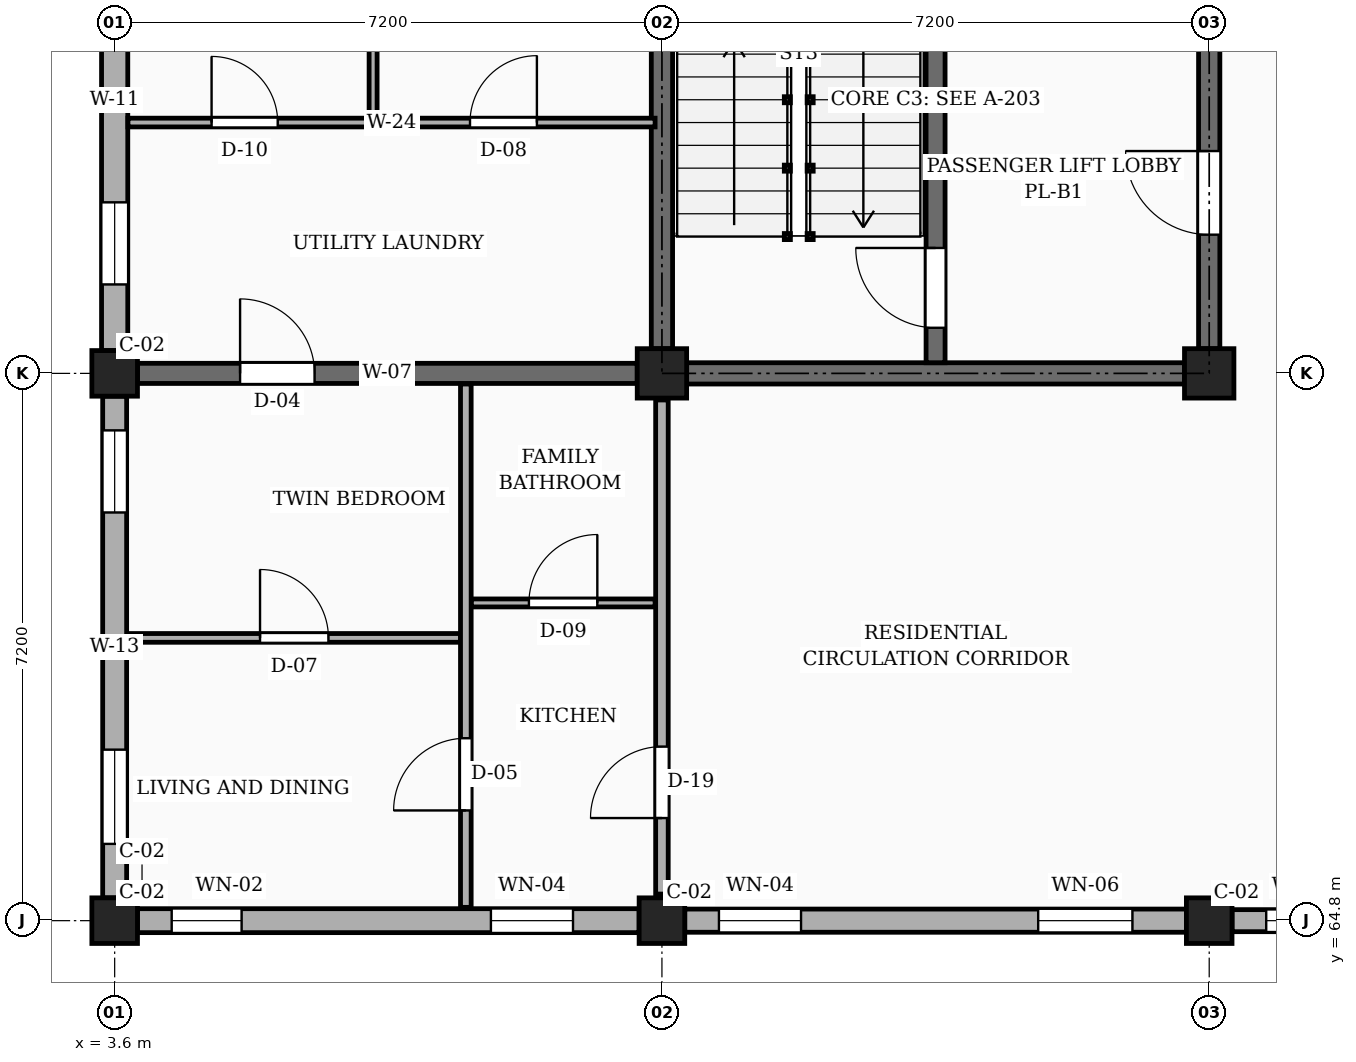
"""IFC4 building model, lengths in metres.
Left out: names, types, materials, properties, quantities, classifications, styles, units other than length and angle.
Written with IfcOpenShell. Run it as: python <this file> out.ifc"""

import sys

from ifc_helpers import new_model, si_unit, direction, frame, frame_2d, origin, origin_2d, place, context, subcontext, project, spatial, rectangle, extrude, element, fill, save


model = new_model("IFC4")
c1 = context("Model", 3, precision=1e-05, world=origin(), true_north=direction((0.0, 1.0)))
c2 = subcontext(c1, "Body", "Model", "MODEL_VIEW")
j1 = project(units=[si_unit("LENGTHUNIT", "METRE"), si_unit("PLANEANGLEUNIT", "RADIAN")], contexts=[c1])
p1 = place(None, origin())
s1 = spatial("IfcSite", under=j1, at=p1, CompositionType="ELEMENT")
p2 = place(p1, origin())
s2 = spatial("IfcBuilding", under=s1, at=p2, CompositionType="ELEMENT")
p3 = place(p2, frame((0.0, 0.0, 4.5)))
s3 = spatial("IfcBuildingStorey", under=s2, at=p3, CompositionType="ELEMENT", Elevation=4.5)
for number, where, z_axis, x_axis in (
    (1, (3.6, 64.8, 0.0), (0.0, 0.0, 1.0), (1.0, 0.0, 0.0)),
    (2, (3.6, 72.0, 0.0), (0.0, 0.0, 1.0), (1.0, 0.0, 0.0)),
    (3, (10.8, 64.8, 0.0), (0.0, 0.0, 1.0), (1.0, 0.0, 0.0)),
):
    element("IfcColumn", number, at=place(p3, frame(where, z_axis=z_axis, x_axis=x_axis)), inside=s3, PredefinedType="COLUMN", context=c2, shape_type="SweptSolid", body=[
        extrude(rectangle(XDim=0.6, YDim=0.6, at=origin_2d()), origin(), (0.0, 0.0, 1.0), 3.15),
    ])
p4 = place(p3, frame((10.8, 72.0, 0.0), z_axis=(0.0, 0.0, 1.0), x_axis=(1.0, 0.0, 0.0)))
e4 = element("IfcColumn", 4, at=p4, inside=s3, PredefinedType="COLUMN", context=c2, shape_type="SweptSolid", body=[
    extrude(rectangle(XDim=0.65, YDim=0.65, at=origin_2d()), origin(), (0.0, 0.0, 1.0), 3.15),
])
p5 = place(p3, frame((18.0, 64.8, 0.0), z_axis=(0.0, 0.0, 1.0), x_axis=(1.0, 0.0, 0.0)))
e5 = element("IfcColumn", 5, at=p5, inside=s3, PredefinedType="COLUMN", context=c2, shape_type="SweptSolid", body=[
    extrude(rectangle(XDim=0.6, YDim=0.6, at=origin_2d()), origin(), (0.0, 0.0, 1.0), 3.15),
])
p6 = place(p3, frame((18.0, 72.0, 0.0), z_axis=(0.0, 0.0, 1.0), x_axis=(1.0, 0.0, 0.0)))
e6 = element("IfcColumn", 6, at=p6, inside=s3, PredefinedType="COLUMN", context=c2, shape_type="SweptSolid", body=[
    extrude(rectangle(XDim=0.65, YDim=0.65, at=origin_2d()), origin(), (0.0, 0.0, 1.0), 3.15),
])
p7 = place(p3, frame((3.9, 72.0, 0.0), z_axis=(0.0, 0.0, 1.0), x_axis=(1.0, 0.0, 0.0)))
e7 = element("IfcWall", 7, at=p7, inside=s3, PredefinedType="SOLIDWALL", context=c2, shape_type="SweptSolid", body=[
    extrude(rectangle(XDim=6.575, YDim=0.265, at=frame_2d((3.288, 0.0))), origin(), (0.0, 0.0, 1.0), 2.21),
])
p8 = place(p7, frame((1.35, 0.0, 0.0)))
e8 = element("IfcOpeningElement", 8, at=p8, cuts=e7, PredefinedType="OPENING", context=c2, shape_type="SweptSolid", body=[
    extrude(rectangle(XDim=0.98, YDim=2.12, at=frame_2d((0.49, 1.06))), frame((0.0, 0.143, 0.0), z_axis=(0.0, -1.0, 0.0), x_axis=(1.0, 0.0, 0.0)), (0.0, 0.0, 1.0), 0.285),
])
p9 = place(p3, frame((3.9, 64.8, 0.0), z_axis=(0.0, 0.0, 1.0), x_axis=(1.0, 0.0, 0.0)))
e9 = element("IfcWall", 9, at=p9, inside=s3, PredefinedType="SOLIDWALL", context=c2, shape_type="SweptSolid", body=[
    extrude(rectangle(XDim=6.6, YDim=0.315, at=frame_2d((3.3, 0.0))), origin(), (0.0, 0.0, 1.0), 2.48),
])
p10 = place(p9, frame((0.45, 0.0, 0.78)))
e10 = element("IfcOpeningElement", 10, at=p10, cuts=e9, PredefinedType="OPENING", context=c2, shape_type="SweptSolid", body=[
    extrude(rectangle(XDim=0.92, YDim=1.15, at=frame_2d((0.46, 0.575))), frame((0.0, 0.167, 0.0), z_axis=(0.0, -1.0, 0.0), x_axis=(1.0, 0.0, 0.0)), (0.0, 0.0, 1.0), 0.335),
])
p11 = place(p9, frame((4.65, 0.0, 0.78)))
e11 = element("IfcOpeningElement", 11, at=p11, cuts=e9, PredefinedType="OPENING", context=c2, shape_type="SweptSolid", body=[
    extrude(rectangle(XDim=1.08, YDim=1.15, at=frame_2d((0.54, 0.575))), frame((0.0, 0.167, 0.0), z_axis=(0.0, -1.0, 0.0), x_axis=(1.0, 0.0, 0.0)), (0.0, 0.0, 1.0), 0.335),
])
p12 = place(p3, frame((11.1, 64.8, 0.0), z_axis=(0.0, 0.0, 1.0), x_axis=(1.0, 0.0, 0.0)))
e12 = element("IfcWall", 12, at=p12, inside=s3, PredefinedType="SOLIDWALL", context=c2, shape_type="SweptSolid", body=[
    extrude(rectangle(XDim=6.6, YDim=0.305, at=frame_2d((3.3, 0.0))), origin(), (0.0, 0.0, 1.0), 2.48),
])
p13 = place(p12, frame((0.45, 0.0, 0.78)))
e13 = element("IfcOpeningElement", 13, at=p13, cuts=e12, PredefinedType="OPENING", context=c2, shape_type="SweptSolid", body=[
    extrude(rectangle(XDim=1.08, YDim=1.15, at=frame_2d((0.54, 0.575))), frame((0.0, 0.163, 0.0), z_axis=(0.0, -1.0, 0.0), x_axis=(1.0, 0.0, 0.0)), (0.0, 0.0, 1.0), 0.325),
])
p14 = place(p12, frame((4.65, 0.0, 0.78)))
e14 = element("IfcOpeningElement", 14, at=p14, cuts=e12, PredefinedType="OPENING", context=c2, shape_type="SweptSolid", body=[
    extrude(rectangle(XDim=1.24, YDim=1.15, at=frame_2d((0.62, 0.575))), frame((0.0, 0.163, 0.0), z_axis=(0.0, -1.0, 0.0), x_axis=(1.0, 0.0, 0.0)), (0.0, 0.0, 1.0), 0.325),
])
p15 = place(p3, frame((18.3, 64.8, 0.0), z_axis=(0.0, 0.0, 1.0), x_axis=(1.0, 0.0, 0.0)))
e15 = element("IfcWall", 15, at=p15, inside=s3, PredefinedType="SOLIDWALL", context=c2, shape_type="SweptSolid", body=[
    extrude(rectangle(XDim=6.6, YDim=0.29, at=frame_2d((3.3, 0.0))), origin(), (0.0, 0.0, 1.0), 2.48),
])
p16 = place(p15, frame((0.45, 0.0, 0.78)))
e16 = element("IfcOpeningElement", 16, at=p16, cuts=e15, PredefinedType="OPENING", context=c2, shape_type="SweptSolid", body=[
    extrude(rectangle(XDim=1.04, YDim=1.26, at=frame_2d((0.52, 0.63))), frame((0.0, 0.155, 0.0), z_axis=(0.0, -1.0, 0.0), x_axis=(1.0, 0.0, 0.0)), (0.0, 0.0, 1.0), 0.31),
])
p17 = place(p15, frame((2.13, 0.0, 0.78)))
e17 = element("IfcOpeningElement", 17, at=p17, cuts=e15, PredefinedType="OPENING", context=c2, shape_type="SweptSolid", body=[
    extrude(rectangle(XDim=1.2, YDim=1.26, at=frame_2d((0.6, 0.63))), frame((0.0, 0.155, 0.0), z_axis=(0.0, -1.0, 0.0), x_axis=(1.0, 0.0, 0.0)), (0.0, 0.0, 1.0), 0.31),
])
p18 = place(p15, frame((4.58, 0.0, 0.78)))
e18 = element("IfcOpeningElement", 18, at=p18, cuts=e15, PredefinedType="OPENING", context=c2, shape_type="SweptSolid", body=[
    extrude(rectangle(XDim=0.96, YDim=1.26, at=frame_2d((0.48, 0.63))), frame((0.0, 0.155, 0.0), z_axis=(0.0, -1.0, 0.0), x_axis=(1.0, 0.0, 0.0)), (0.0, 0.0, 1.0), 0.31),
])
p19 = place(p3, frame((3.6, 78.9, 0.0), z_axis=(0.0, 0.0, 1.0), x_axis=(0.0, -1.0, 0.0)))
e19 = element("IfcWall", 19, at=p19, inside=s3, PredefinedType="SOLIDWALL", context=c2, shape_type="SweptSolid", body=[
    extrude(rectangle(XDim=6.6, YDim=0.345, at=frame_2d((3.3, 0.0))), origin(), (0.0, 0.0, 1.0), 2.48),
])
p20 = place(p19, frame((0.45, 0.0, 0.78)))
e20 = element("IfcOpeningElement", 20, at=p20, cuts=e19, PredefinedType="OPENING", context=c2, shape_type="SweptSolid", body=[
    extrude(rectangle(XDim=0.92, YDim=1.15, at=frame_2d((0.46, 0.575))), frame((0.0, 0.183, 0.0), z_axis=(0.0, -1.0, 0.0), x_axis=(1.0, 0.0, 0.0)), (0.0, 0.0, 1.0), 0.365),
])
p21 = place(p19, frame((4.65, 0.0, 0.78)))
e21 = element("IfcOpeningElement", 21, at=p21, cuts=e19, PredefinedType="OPENING", context=c2, shape_type="SweptSolid", body=[
    extrude(rectangle(XDim=1.08, YDim=1.15, at=frame_2d((0.54, 0.575))), frame((0.0, 0.183, 0.0), z_axis=(0.0, -1.0, 0.0), x_axis=(1.0, 0.0, 0.0)), (0.0, 0.0, 1.0), 0.365),
])
p22 = place(p3, frame((3.6, 71.7, 0.0), z_axis=(0.0, 0.0, 1.0), x_axis=(0.0, -1.0, 0.0)))
e22 = element("IfcWall", 22, at=p22, inside=s3, PredefinedType="SOLIDWALL", context=c2, shape_type="SweptSolid", body=[
    extrude(rectangle(XDim=6.6, YDim=0.315, at=frame_2d((3.3, 0.0))), origin(), (0.0, 0.0, 1.0), 2.48),
])
p23 = place(p22, frame((0.45, 0.0, 0.78)))
e23 = element("IfcOpeningElement", 23, at=p23, cuts=e22, PredefinedType="OPENING", context=c2, shape_type="SweptSolid", body=[
    extrude(rectangle(XDim=1.08, YDim=1.15, at=frame_2d((0.54, 0.575))), frame((0.0, 0.167, 0.0), z_axis=(0.0, -1.0, 0.0), x_axis=(1.0, 0.0, 0.0)), (0.0, 0.0, 1.0), 0.335),
])
p24 = place(p22, frame((4.65, 0.0, 0.78)))
e24 = element("IfcOpeningElement", 24, at=p24, cuts=e22, PredefinedType="OPENING", context=c2, shape_type="SweptSolid", body=[
    extrude(rectangle(XDim=1.24, YDim=1.15, at=frame_2d((0.62, 0.575))), frame((0.0, 0.167, 0.0), z_axis=(0.0, -1.0, 0.0), x_axis=(1.0, 0.0, 0.0)), (0.0, 0.0, 1.0), 0.335),
])
p25 = place(p3, frame((10.8, 72.325, 0.0), z_axis=(0.0, 0.0, 1.0), x_axis=(0.0, 1.0, 0.0)))
e25 = element("IfcWall", 25, at=p25, inside=s3, PredefinedType="SHEAR", context=c2, shape_type="SweptSolid", body=[
    extrude(rectangle(XDim=6.55, YDim=0.28, at=frame_2d((3.275, 0.0))), origin(), (0.0, 0.0, 1.0), 2.91),
])
p26 = place(p3, frame((18.0, 72.325, 0.0), z_axis=(0.0, 0.0, 1.0), x_axis=(0.0, 1.0, 0.0)))
e26 = element("IfcWall", 26, at=p26, inside=s3, PredefinedType="SHEAR", context=c2, shape_type="SweptSolid", body=[
    extrude(rectangle(XDim=6.55, YDim=0.28, at=frame_2d((3.275, 0.0))), origin(), (0.0, 0.0, 1.0), 2.91),
])
p27 = place(p26, frame((1.5, 0.0, 0.0)))
e27 = element("IfcOpeningElement", 27, at=p27, cuts=e26, PredefinedType="OPENING", context=c2, shape_type="SweptSolid", body=[
    extrude(rectangle(XDim=1.1, YDim=2.15, at=frame_2d((0.55, 1.075))), frame((0.0, 0.15, 0.0), z_axis=(0.0, -1.0, 0.0), x_axis=(1.0, 0.0, 0.0)), (0.0, 0.0, 1.0), 0.3),
])
p28 = place(p3, frame((11.125, 72.0, 0.0), z_axis=(0.0, 0.0, 1.0), x_axis=(1.0, 0.0, 0.0)))
e28 = element("IfcWall", 28, at=p28, inside=s3, PredefinedType="SHEAR", context=c2, shape_type="SweptSolid", body=[
    extrude(rectangle(XDim=6.55, YDim=0.28, at=frame_2d((3.275, 0.0))), origin(), (0.0, 0.0, 1.0), 2.91),
])
p29 = place(p3, frame((14.4, 72.14, 0.0), z_axis=(0.0, 0.0, 1.0), x_axis=(0.0, 1.0, 0.0)))
e29 = element("IfcWall", 29, at=p29, inside=s3, PredefinedType="SHEAR", context=c2, shape_type="SweptSolid", body=[
    extrude(rectangle(XDim=6.92, YDim=0.25, at=frame_2d((3.46, 0.0))), origin(), (0.0, 0.0, 1.0), 2.91),
])
p30 = place(p29, frame((0.46, 0.0, 0.0)))
e30 = element("IfcOpeningElement", 30, at=p30, cuts=e29, PredefinedType="OPENING", context=c2, shape_type="SweptSolid", body=[
    extrude(rectangle(XDim=1.05, YDim=2.15, at=frame_2d((0.525, 1.075))), frame((0.0, 0.135, 0.0), z_axis=(0.0, -1.0, 0.0), x_axis=(1.0, 0.0, 0.0)), (0.0, 0.0, 1.0), 0.27),
])
p31 = place(p3, frame((10.8, 65.15, 0.0), z_axis=(0.0, 0.0, 1.0), x_axis=(0.0, 1.0, 0.0)))
e31 = element("IfcWall", 31, at=p31, inside=s3, PredefinedType="PARTITIONING", context=c2, shape_type="SweptSolid", body=[
    extrude(rectangle(XDim=6.5, YDim=0.165, at=frame_2d((3.25, 0.0))), origin(), (0.0, 0.0, 1.0), 2.26),
])
p32 = place(p31, frame((1.0, 0.0, 0.0)))
e32 = element("IfcOpeningElement", 32, at=p32, cuts=e31, PredefinedType="OPENING", context=c2, shape_type="SweptSolid", body=[
    extrude(rectangle(XDim=0.94, YDim=2.12, at=frame_2d((0.47, 1.06))), frame((0.0, 0.093, 0.0), z_axis=(0.0, -1.0, 0.0), x_axis=(1.0, 0.0, 0.0)), (0.0, 0.0, 1.0), 0.185),
])
p33 = place(p3, frame((3.775, 68.52, 0.0), z_axis=(0.0, 0.0, 1.0), x_axis=(1.0, 0.0, 0.0)))
e33 = element("IfcWall", 33, at=p33, inside=s3, PredefinedType="PARTITIONING", context=c2, shape_type="SweptSolid", body=[
    extrude(rectangle(XDim=4.375, YDim=0.115, at=frame_2d((2.188, 0.0))), origin(), (0.0, 0.0, 1.0), 2.345),
])
p34 = place(p33, frame((1.738, 0.0, 0.0)))
e34 = element("IfcOpeningElement", 34, at=p34, cuts=e33, PredefinedType="OPENING", context=c2, shape_type="SweptSolid", body=[
    extrude(rectangle(XDim=0.9, YDim=2.1, at=frame_2d((0.45, 1.05))), frame((0.0, 0.067, 0.0), z_axis=(0.0, -1.0, 0.0), x_axis=(1.0, 0.0, 0.0)), (0.0, 0.0, 1.0), 0.135),
])
p35 = place(p3, frame((8.29, 68.98, 0.0), z_axis=(0.0, 0.0, 1.0), x_axis=(1.0, 0.0, 0.0)))
e35 = element("IfcWall", 35, at=p35, inside=s3, PredefinedType="PARTITIONING", context=c2, shape_type="SweptSolid", body=[
    extrude(rectangle(XDim=2.42, YDim=0.105, at=frame_2d((1.21, 0.0))), origin(), (0.0, 0.0, 1.0), 2.345),
])
p36 = place(p35, frame((0.76, 0.0, 0.0)))
e36 = element("IfcOpeningElement", 36, at=p36, cuts=e35, PredefinedType="OPENING", context=c2, shape_type="SweptSolid", body=[
    extrude(rectangle(XDim=0.9, YDim=2.05, at=frame_2d((0.45, 1.025))), frame((0.0, 0.062, 0.0), z_axis=(0.0, -1.0, 0.0), x_axis=(1.0, 0.0, 0.0)), (0.0, 0.0, 1.0), 0.125),
])
p37 = place(p3, frame((8.22, 64.975, 0.0), z_axis=(0.0, 0.0, 1.0), x_axis=(0.0, 1.0, 0.0)))
e37 = element("IfcWall", 37, at=p37, inside=s3, PredefinedType="PARTITIONING", context=c2, shape_type="SweptSolid", body=[
    extrude(rectangle(XDim=6.885, YDim=0.14, at=frame_2d((3.442, 0.0))), origin(), (0.0, 0.0, 1.0), 2.345),
])
p38 = place(p37, frame((1.275, 0.0, 0.0)))
e38 = element("IfcOpeningElement", 38, at=p38, cuts=e37, PredefinedType="OPENING", context=c2, shape_type="SweptSolid", body=[
    extrude(rectangle(XDim=0.95, YDim=2.1, at=frame_2d((0.475, 1.05))), frame((0.0, 0.08, 0.0), z_axis=(0.0, -1.0, 0.0), x_axis=(1.0, 0.0, 0.0)), (0.0, 0.0, 1.0), 0.16),
])
p39 = place(p3, frame((3.775, 75.3, 0.0), z_axis=(0.0, 0.0, 1.0), x_axis=(1.0, 0.0, 0.0)))
e39 = element("IfcWall", 39, at=p39, inside=s3, PredefinedType="PARTITIONING", context=c2, shape_type="SweptSolid", body=[
    extrude(rectangle(XDim=6.935, YDim=0.115, at=frame_2d((3.468, 0.0))), origin(), (0.0, 0.0, 1.0), 2.345),
])
p40 = place(p39, frame((1.1, 0.0, 0.0)))
e40 = element("IfcOpeningElement", 40, at=p40, cuts=e39, PredefinedType="OPENING", context=c2, shape_type="SweptSolid", body=[
    extrude(rectangle(XDim=0.87, YDim=2.05, at=frame_2d((0.435, 1.025))), frame((0.0, 0.067, 0.0), z_axis=(0.0, -1.0, 0.0), x_axis=(1.0, 0.0, 0.0)), (0.0, 0.0, 1.0), 0.135),
])
p41 = place(p39, frame((4.5, 0.0, 0.0)))
e41 = element("IfcOpeningElement", 41, at=p41, cuts=e39, PredefinedType="OPENING", context=c2, shape_type="SweptSolid", body=[
    extrude(rectangle(XDim=0.88, YDim=2.08, at=frame_2d((0.44, 1.04))), frame((0.0, 0.067, 0.0), z_axis=(0.0, -1.0, 0.0), x_axis=(1.0, 0.0, 0.0)), (0.0, 0.0, 1.0), 0.135),
])
p42 = place(p3, frame((7.0, 75.37, 0.0), z_axis=(0.0, 0.0, 1.0), x_axis=(0.0, 1.0, 0.0)))
e42 = element("IfcWall", 42, at=p42, inside=s3, PredefinedType="PARTITIONING", context=c2, shape_type="SweptSolid", body=[
    extrude(rectangle(XDim=3.69, YDim=0.105, at=frame_2d((1.845, 0.0))), origin(), (0.0, 0.0, 1.0), 2.345),
])
p43 = place(p10, origin())
e43 = element("IfcWindow", 43, at=p43, inside=s3, PartitioningType="SINGLE_PANEL", PredefinedType="WINDOW", context=c2, shape_type="SweptSolid", body=[
    extrude(rectangle(XDim=0.92, YDim=1.15, at=frame_2d((0.46, 0.575))), frame((0.0, 0.03, 0.0), z_axis=(0.0, -1.0, 0.0), x_axis=(1.0, 0.0, 0.0)), (0.0, 0.0, 1.0), 0.06),
])
fill(e10, e43)
p44 = place(p11, origin())
e44 = element("IfcWindow", 44, at=p44, inside=s3, PartitioningType="SINGLE_PANEL", PredefinedType="WINDOW", context=c2, shape_type="SweptSolid", body=[
    extrude(rectangle(XDim=1.08, YDim=1.15, at=frame_2d((0.54, 0.575))), frame((0.0, 0.03, 0.0), z_axis=(0.0, -1.0, 0.0), x_axis=(1.0, 0.0, 0.0)), (0.0, 0.0, 1.0), 0.06),
])
fill(e11, e44)
p45 = place(p13, origin())
e45 = element("IfcWindow", 45, at=p45, inside=s3, PartitioningType="SINGLE_PANEL", PredefinedType="WINDOW", context=c2, shape_type="SweptSolid", body=[
    extrude(rectangle(XDim=1.08, YDim=1.15, at=frame_2d((0.54, 0.575))), frame((0.0, 0.03, 0.0), z_axis=(0.0, -1.0, 0.0), x_axis=(1.0, 0.0, 0.0)), (0.0, 0.0, 1.0), 0.06),
])
fill(e13, e45)
p46 = place(p14, origin())
e46 = element("IfcWindow", 46, at=p46, inside=s3, PartitioningType="SINGLE_PANEL", PredefinedType="WINDOW", context=c2, shape_type="SweptSolid", body=[
    extrude(rectangle(XDim=1.24, YDim=1.15, at=frame_2d((0.62, 0.575))), frame((0.0, 0.03, 0.0), z_axis=(0.0, -1.0, 0.0), x_axis=(1.0, 0.0, 0.0)), (0.0, 0.0, 1.0), 0.06),
])
fill(e14, e46)
p47 = place(p16, origin())
e47 = element("IfcWindow", 47, at=p47, inside=s3, PartitioningType="SINGLE_PANEL", PredefinedType="WINDOW", context=c2, shape_type="SweptSolid", body=[
    extrude(rectangle(XDim=1.04, YDim=1.26, at=frame_2d((0.52, 0.63))), frame((0.0, 0.03, 0.0), z_axis=(0.0, -1.0, 0.0), x_axis=(1.0, 0.0, 0.0)), (0.0, 0.0, 1.0), 0.06),
])
fill(e16, e47)
p48 = place(p21, origin())
e48 = element("IfcWindow", 48, at=p48, inside=s3, PartitioningType="SINGLE_PANEL", PredefinedType="WINDOW", context=c2, shape_type="SweptSolid", body=[
    extrude(rectangle(XDim=1.08, YDim=1.15, at=frame_2d((0.54, 0.575))), frame((0.0, 0.03, 0.0), z_axis=(0.0, -1.0, 0.0), x_axis=(1.0, 0.0, 0.0)), (0.0, 0.0, 1.0), 0.06),
])
fill(e21, e48)
p49 = place(p23, origin())
e49 = element("IfcWindow", 49, at=p49, inside=s3, PartitioningType="SINGLE_PANEL", PredefinedType="WINDOW", context=c2, shape_type="SweptSolid", body=[
    extrude(rectangle(XDim=1.08, YDim=1.15, at=frame_2d((0.54, 0.575))), frame((0.0, 0.03, 0.0), z_axis=(0.0, -1.0, 0.0), x_axis=(1.0, 0.0, 0.0)), (0.0, 0.0, 1.0), 0.06),
])
fill(e23, e49)
p50 = place(p24, origin())
e50 = element("IfcWindow", 50, at=p50, inside=s3, PartitioningType="SINGLE_PANEL", PredefinedType="WINDOW", context=c2, shape_type="SweptSolid", body=[
    extrude(rectangle(XDim=1.24, YDim=1.15, at=frame_2d((0.62, 0.575))), frame((0.0, 0.03, 0.0), z_axis=(0.0, -1.0, 0.0), x_axis=(1.0, 0.0, 0.0)), (0.0, 0.0, 1.0), 0.06),
])
fill(e24, e50)
p51 = place(p27, frame((1.1, 0.0, 0.0), z_axis=(0.0, 0.0, 1.0), x_axis=(-1.0, 0.0, 0.0)))
e51 = element("IfcDoor", 51, at=p51, inside=s3, OperationType="SINGLE_SWING_RIGHT", PredefinedType="DOOR", context=c2, shape_type="SweptSolid", body=[
    extrude(rectangle(XDim=1.1, YDim=2.15, at=frame_2d((0.55, 1.075))), frame((0.0, 0.025, 0.0), z_axis=(0.0, -1.0, 0.0), x_axis=(1.0, 0.0, 0.0)), (0.0, 0.0, 1.0), 0.05),
])
fill(e27, e51)
p52 = place(p30, origin())
e52 = element("IfcDoor", 52, at=p52, inside=s3, OperationType="SINGLE_SWING_RIGHT", PredefinedType="DOOR", context=c2, shape_type="SweptSolid", body=[
    extrude(rectangle(XDim=1.05, YDim=2.15, at=frame_2d((0.525, 1.075))), frame((0.0, 0.025, 0.0), z_axis=(0.0, -1.0, 0.0), x_axis=(1.0, 0.0, 0.0)), (0.0, 0.0, 1.0), 0.05),
])
fill(e30, e52)
p53 = place(p32, origin())
e53 = element("IfcDoor", 53, at=p53, inside=s3, OperationType="SINGLE_SWING_LEFT", PredefinedType="DOOR", context=c2, shape_type="SweptSolid", body=[
    extrude(rectangle(XDim=0.94, YDim=2.12, at=frame_2d((0.47, 1.06))), frame((0.0, 0.025, 0.0), z_axis=(0.0, -1.0, 0.0), x_axis=(1.0, 0.0, 0.0)), (0.0, 0.0, 1.0), 0.05),
])
fill(e32, e53)
p54 = place(p34, origin())
e54 = element("IfcDoor", 54, at=p54, inside=s3, OperationType="SINGLE_SWING_LEFT", PredefinedType="DOOR", context=c2, shape_type="SweptSolid", body=[
    extrude(rectangle(XDim=0.9, YDim=2.1, at=frame_2d((0.45, 1.05))), frame((0.0, 0.025, 0.0), z_axis=(0.0, -1.0, 0.0), x_axis=(1.0, 0.0, 0.0)), (0.0, 0.0, 1.0), 0.05),
])
fill(e34, e54)
p55 = place(p36, origin())
e55 = element("IfcDoor", 55, at=p55, inside=s3, OperationType="SINGLE_SWING_RIGHT", PredefinedType="DOOR", context=c2, shape_type="SweptSolid", body=[
    extrude(rectangle(XDim=0.9, YDim=2.05, at=frame_2d((0.45, 1.025))), frame((0.0, 0.025, 0.0), z_axis=(0.0, -1.0, 0.0), x_axis=(1.0, 0.0, 0.0)), (0.0, 0.0, 1.0), 0.05),
])
fill(e36, e55)
p56 = place(p38, origin())
e56 = element("IfcDoor", 56, at=p56, inside=s3, OperationType="SINGLE_SWING_LEFT", PredefinedType="DOOR", context=c2, shape_type="SweptSolid", body=[
    extrude(rectangle(XDim=0.95, YDim=2.1, at=frame_2d((0.475, 1.05))), frame((0.0, 0.025, 0.0), z_axis=(0.0, -1.0, 0.0), x_axis=(1.0, 0.0, 0.0)), (0.0, 0.0, 1.0), 0.05),
])
fill(e38, e56)
p57 = place(p40, origin())
e57 = element("IfcDoor", 57, at=p57, inside=s3, OperationType="SINGLE_SWING_LEFT", PredefinedType="DOOR", context=c2, shape_type="SweptSolid", body=[
    extrude(rectangle(XDim=0.87, YDim=2.05, at=frame_2d((0.435, 1.025))), frame((0.0, 0.025, 0.0), z_axis=(0.0, -1.0, 0.0), x_axis=(1.0, 0.0, 0.0)), (0.0, 0.0, 1.0), 0.05),
])
fill(e40, e57)
p58 = place(p41, origin())
e58 = element("IfcDoor", 58, at=p58, inside=s3, OperationType="SINGLE_SWING_RIGHT", PredefinedType="DOOR", context=c2, shape_type="SweptSolid", body=[
    extrude(rectangle(XDim=0.88, YDim=2.08, at=frame_2d((0.44, 1.04))), frame((0.0, 0.025, 0.0), z_axis=(0.0, -1.0, 0.0), x_axis=(1.0, 0.0, 0.0)), (0.0, 0.0, 1.0), 0.05),
])
fill(e41, e58)
p59 = place(p8, origin())
e59 = element("IfcDoor", 59, at=p59, inside=s3, OperationType="SINGLE_SWING_LEFT", PredefinedType="DOOR", context=c2, shape_type="SweptSolid", body=[
    extrude(rectangle(XDim=0.98, YDim=2.12, at=frame_2d((0.49, 1.06))), frame((0.0, 0.025, 0.0), z_axis=(0.0, -1.0, 0.0), x_axis=(1.0, 0.0, 0.0)), (0.0, 0.0, 1.0), 0.05),
])
fill(e8, e59)
save(model, sys.argv[1])
